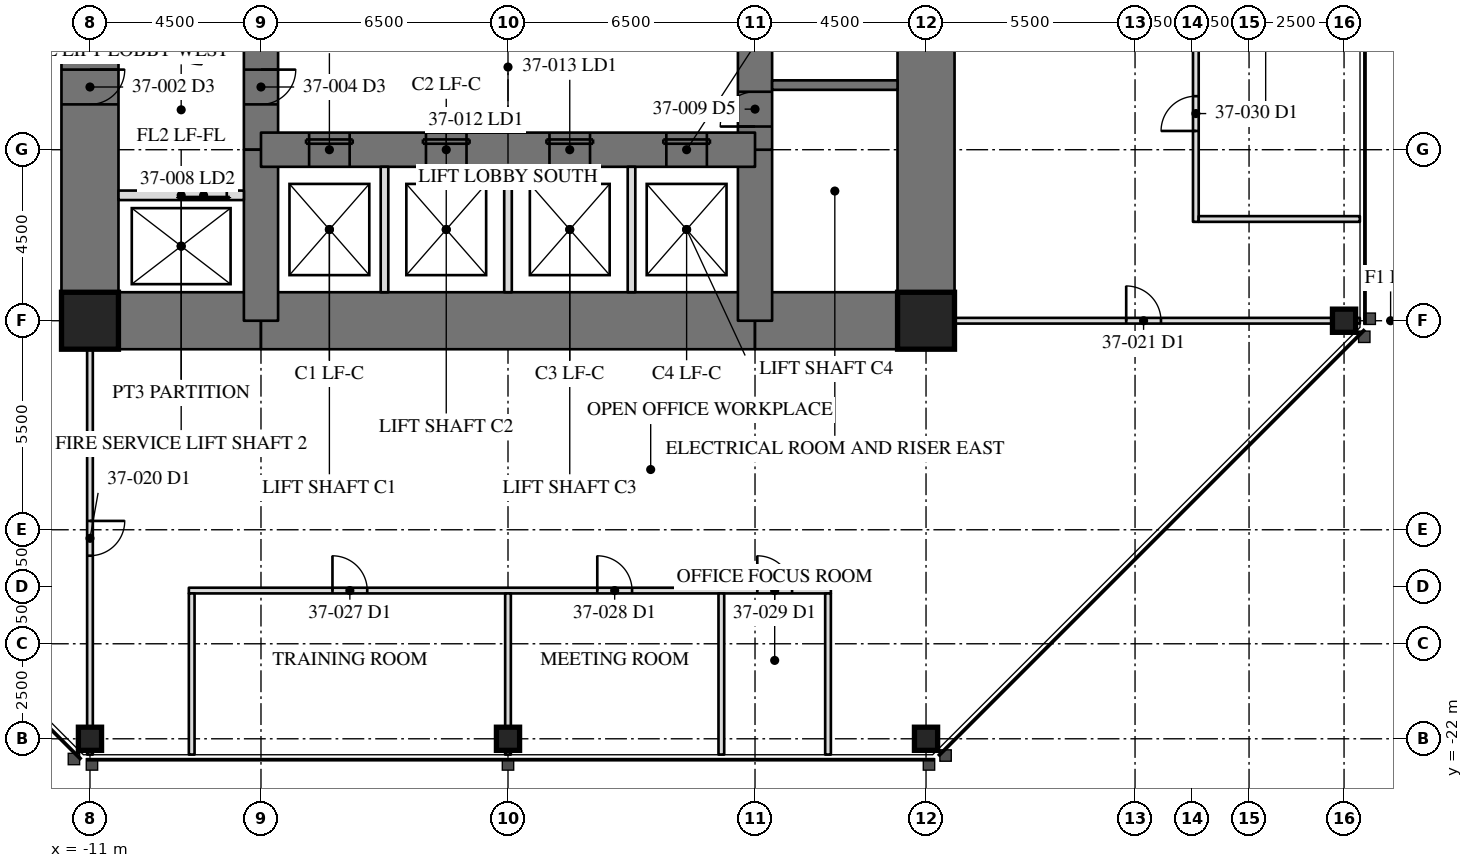
"""IFC4 building model, lengths in metres.
Left out: names, types, materials, properties, quantities, classifications, styles, units other than length and angle.
Written with IfcOpenShell. Run it as: python <this file> out.ifc"""

import sys

from ifc_helpers import new_model, si_unit, direction, frame, frame_2d, origin, origin_2d, place, context, subcontext, project, spatial, rectangle, hollow_rectangle, extrude, element, fill, save


model = new_model("IFC4")
c1 = context("Model", 3, precision=1e-05, world=origin(), true_north=direction((0.0, 1.0)))
c2 = subcontext(c1, "Body", "Model", "MODEL_VIEW")
j1 = project(units=[si_unit("LENGTHUNIT", "METRE"), si_unit("PLANEANGLEUNIT", "RADIAN")], contexts=[c1])
p1 = place(None, origin())
s1 = spatial("IfcSite", under=j1, at=p1, CompositionType="ELEMENT")
p2 = place(p1, origin())
s2 = spatial("IfcBuilding", under=s1, at=p2, CompositionType="ELEMENT")
p3 = place(p2, frame((0.0, 0.0, 158.2)))
s3 = spatial("IfcBuildingStorey", under=s2, at=p3, CompositionType="ELEMENT", Elevation=158.2)
for number, where, z_axis, x_axis in (
    (1, (-11.0, -22.0, 0.0), (0.0, 0.0, 1.0), (1.0, 0.0, 0.0)),
    (2, (0.0, -22.0, 0.0), (0.0, 0.0, 1.0), (1.0, 0.0, 0.0)),
    (3, (11.0, -22.0, 0.0), (0.0, 0.0, 1.0), (1.0, 0.0, 0.0)),
    (4, (22.0, -11.0, 0.0), (0.0, 0.0, 1.0), (0.0, 1.0, 0.0)),
):
    element("IfcColumn", number, at=place(p3, frame(where, z_axis=z_axis, x_axis=x_axis)), inside=s3, PredefinedType="COLUMN", context=c2, shape_type="SweptSolid", body=[
        extrude(hollow_rectangle(XDim=0.61, YDim=0.61, WallThickness=0.076, at=origin_2d()), origin(), (0.0, 0.0, 1.0), 4.1),
    ])
p4 = place(p3, frame((11.0, -11.0, 0.0), z_axis=(0.0, 0.0, 1.0), x_axis=(0.0, 1.0, 0.0)))
e5 = element("IfcWall", 5, at=p4, inside=s3, PredefinedType="SHEAR", context=c2, shape_type="SweptSolid", body=[
    extrude(rectangle(XDim=22.0, YDim=1.5, at=frame_2d((11.0, 0.0))), origin(), (0.0, 0.0, 1.0), 4.1),
])
p5 = place(p4, frame((15.393, 0.0, 0.0)))
e6 = element("IfcOpeningElement", 6, at=p5, cuts=e5, PredefinedType="OPENING", context=c2, shape_type="SweptSolid", body=[
    extrude(rectangle(XDim=0.915, YDim=2.134, at=frame_2d((0.458, 1.067))), frame((0.0, 0.76, 0.0), z_axis=(0.0, -1.0, 0.0), x_axis=(1.0, 0.0, 0.0)), (0.0, 0.0, 1.0), 1.52),
])
p6 = place(p3, frame((-11.0, 11.0, 0.0), z_axis=(0.0, 0.0, 1.0), x_axis=(0.0, -1.0, 0.0)))
e7 = element("IfcWall", 7, at=p6, inside=s3, PredefinedType="SHEAR", context=c2, shape_type="SweptSolid", body=[
    extrude(rectangle(XDim=22.0, YDim=1.5, at=frame_2d((11.0, 0.0))), origin(), (0.0, 0.0, 1.0), 4.1),
])
p7 = place(p6, frame((15.393, 0.0, 0.0)))
e8 = element("IfcOpeningElement", 8, at=p7, cuts=e7, PredefinedType="OPENING", context=c2, shape_type="SweptSolid", body=[
    extrude(rectangle(XDim=0.915, YDim=2.134, at=frame_2d((0.458, 1.067))), frame((0.0, 0.76, 0.0), z_axis=(0.0, -1.0, 0.0), x_axis=(1.0, 0.0, 0.0)), (0.0, 0.0, 1.0), 1.52),
])
p8 = place(p3, frame((-11.0, -11.0, 0.0), z_axis=(0.0, 0.0, 1.0), x_axis=(1.0, 0.0, 0.0)))
e9 = element("IfcWall", 9, at=p8, inside=s3, PredefinedType="SHEAR", context=c2, shape_type="SweptSolid", body=[
    extrude(rectangle(XDim=4.5, YDim=1.5, at=frame_2d((2.25, 0.0))), origin(), (0.0, 0.0, 1.0), 4.1),
])
p9 = place(p3, frame((-6.5, -11.0, 0.0), z_axis=(0.0, 0.0, 1.0), x_axis=(1.0, 0.0, 0.0)))
e10 = element("IfcWall", 10, at=p9, inside=s3, PredefinedType="SHEAR", context=c2, shape_type="SweptSolid", body=[
    extrude(rectangle(XDim=13.0, YDim=1.5, at=frame_2d((6.5, 0.0))), origin(), (0.0, 0.0, 1.0), 4.1),
])
p10 = place(p3, frame((6.5, -11.0, 0.0), z_axis=(0.0, 0.0, 1.0), x_axis=(1.0, 0.0, 0.0)))
e11 = element("IfcWall", 11, at=p10, inside=s3, PredefinedType="SHEAR", context=c2, shape_type="SweptSolid", body=[
    extrude(rectangle(XDim=4.5, YDim=1.5, at=frame_2d((2.25, 0.0))), origin(), (0.0, 0.0, 1.0), 4.1),
])
p11 = place(p3, frame((6.5, -11.0, 0.0), z_axis=(0.0, 0.0, 1.0), x_axis=(0.0, 1.0, 0.0)))
e12 = element("IfcWall", 12, at=p11, inside=s3, PredefinedType="SHEAR", context=c2, shape_type="SweptSolid", body=[
    extrude(rectangle(XDim=4.5, YDim=0.9, at=frame_2d((2.25, 0.0))), origin(), (0.0, 0.0, 1.0), 4.1),
])
p12 = place(p3, frame((6.5, -6.5, 0.0), z_axis=(0.0, 0.0, 1.0), x_axis=(0.0, 1.0, 0.0)))
e13 = element("IfcWall", 13, at=p12, inside=s3, PredefinedType="SHEAR", context=c2, shape_type="SweptSolid", body=[
    extrude(rectangle(XDim=13.0, YDim=0.9, at=frame_2d((6.5, 0.0))), origin(), (0.0, 0.0, 1.0), 4.1),
])
p13 = place(p12, frame((10.893, 0.0, 0.0)))
e14 = element("IfcOpeningElement", 14, at=p13, cuts=e13, PredefinedType="OPENING", context=c2, shape_type="SweptSolid", body=[
    extrude(rectangle(XDim=0.915, YDim=2.134, at=frame_2d((0.458, 1.067))), frame((0.0, 0.46, 0.0), z_axis=(0.0, -1.0, 0.0), x_axis=(1.0, 0.0, 0.0)), (0.0, 0.0, 1.0), 0.92),
])
p14 = place(p12, frame((0.61, 0.0, 0.0)))
e15 = element("IfcOpeningElement", 15, at=p14, cuts=e13, PredefinedType="OPENING", context=c2, shape_type="SweptSolid", body=[
    extrude(rectangle(XDim=0.915, YDim=2.134, at=frame_2d((0.458, 1.067))), frame((0.0, 0.46, 0.0), z_axis=(0.0, -1.0, 0.0), x_axis=(1.0, 0.0, 0.0)), (0.0, 0.0, 1.0), 0.92),
])
p15 = place(p3, frame((-6.5, 6.5, 0.0), z_axis=(0.0, 0.0, 1.0), x_axis=(0.0, -1.0, 0.0)))
e16 = element("IfcWall", 16, at=p15, inside=s3, PredefinedType="SHEAR", context=c2, shape_type="SweptSolid", body=[
    extrude(rectangle(XDim=13.0, YDim=0.9, at=frame_2d((6.5, 0.0))), origin(), (0.0, 0.0, 1.0), 4.1),
])
p16 = place(p15, frame((10.893, 0.0, 0.0)))
e17 = element("IfcOpeningElement", 17, at=p16, cuts=e16, PredefinedType="OPENING", context=c2, shape_type="SweptSolid", body=[
    extrude(rectangle(XDim=0.915, YDim=2.134, at=frame_2d((0.458, 1.067))), frame((0.0, 0.46, 0.0), z_axis=(0.0, -1.0, 0.0), x_axis=(1.0, 0.0, 0.0)), (0.0, 0.0, 1.0), 0.92),
])
p17 = place(p15, frame((0.61, 0.0, 0.0)))
e18 = element("IfcOpeningElement", 18, at=p17, cuts=e16, PredefinedType="OPENING", context=c2, shape_type="SweptSolid", body=[
    extrude(rectangle(XDim=0.915, YDim=2.134, at=frame_2d((0.458, 1.067))), frame((0.0, 0.46, 0.0), z_axis=(0.0, -1.0, 0.0), x_axis=(1.0, 0.0, 0.0)), (0.0, 0.0, 1.0), 0.92),
])
p18 = place(p3, frame((-6.5, -6.5, 0.0), z_axis=(0.0, 0.0, 1.0), x_axis=(0.0, -1.0, 0.0)))
e19 = element("IfcWall", 19, at=p18, inside=s3, PredefinedType="SHEAR", context=c2, shape_type="SweptSolid", body=[
    extrude(rectangle(XDim=4.5, YDim=0.9, at=frame_2d((2.25, 0.0))), origin(), (0.0, 0.0, 1.0), 4.1),
])
p19 = place(p3, frame((-6.5, -6.5, 0.0), z_axis=(0.0, 0.0, 1.0), x_axis=(1.0, 0.0, 0.0)))
e20 = element("IfcWall", 20, at=p19, inside=s3, PredefinedType="SHEAR", context=c2, shape_type="SweptSolid", body=[
    extrude(rectangle(XDim=13.0, YDim=0.9, at=frame_2d((6.5, 0.0))), origin(), (0.0, 0.0, 1.0), 4.1),
])
p20 = place(p19, frame((1.267, 0.0, 0.0)))
e21 = element("IfcOpeningElement", 21, at=p20, cuts=e20, PredefinedType="OPENING", context=c2, shape_type="SweptSolid", body=[
    extrude(rectangle(XDim=1.067, YDim=2.134, at=frame_2d((0.533, 1.067))), frame((0.0, 0.46, 0.0), z_axis=(0.0, -1.0, 0.0), x_axis=(1.0, 0.0, 0.0)), (0.0, 0.0, 1.0), 0.92),
])
p21 = place(p19, frame((4.342, 0.0, 0.0)))
e22 = element("IfcOpeningElement", 22, at=p21, cuts=e20, PredefinedType="OPENING", context=c2, shape_type="SweptSolid", body=[
    extrude(rectangle(XDim=1.067, YDim=2.134, at=frame_2d((0.533, 1.067))), frame((0.0, 0.46, 0.0), z_axis=(0.0, -1.0, 0.0), x_axis=(1.0, 0.0, 0.0)), (0.0, 0.0, 1.0), 0.92),
])
p22 = place(p19, frame((7.592, 0.0, 0.0)))
e23 = element("IfcOpeningElement", 23, at=p22, cuts=e20, PredefinedType="OPENING", context=c2, shape_type="SweptSolid", body=[
    extrude(rectangle(XDim=1.067, YDim=2.134, at=frame_2d((0.533, 1.067))), frame((0.0, 0.46, 0.0), z_axis=(0.0, -1.0, 0.0), x_axis=(1.0, 0.0, 0.0)), (0.0, 0.0, 1.0), 0.92),
])
p23 = place(p19, frame((10.667, 0.0, 0.0)))
e24 = element("IfcOpeningElement", 24, at=p23, cuts=e20, PredefinedType="OPENING", context=c2, shape_type="SweptSolid", body=[
    extrude(rectangle(XDim=1.067, YDim=2.134, at=frame_2d((0.533, 1.067))), frame((0.0, 0.46, 0.0), z_axis=(0.0, -1.0, 0.0), x_axis=(1.0, 0.0, 0.0)), (0.0, 0.0, 1.0), 0.92),
])
for number, where, z_axis, x_axis in (
    (25, (-11.0, -11.0, 0.0), (0.0, 0.0, 1.0), (1.0, 0.0, 0.0)),
    (26, (11.0, -11.0, 0.0), (0.0, 0.0, 1.0), (1.0, 0.0, 0.0)),
):
    element("IfcColumn", number, at=place(p3, frame(where, z_axis=z_axis, x_axis=x_axis)), inside=s3, PredefinedType="COLUMN", context=c2, shape_type="SweptSolid", body=[
        extrude(hollow_rectangle(XDim=1.499, YDim=1.499, WallThickness=0.102, at=origin_2d()), origin(), (0.0, 0.0, 1.0), 4.1),
    ])
p24 = place(p3, frame((6.95, -4.8, 0.0), z_axis=(0.0, 0.0, 1.0), x_axis=(1.0, 0.0, 0.0)))
e27 = element("IfcWall", 27, at=p24, inside=s3, PredefinedType="SOLIDWALL", context=c2, shape_type="SweptSolid", body=[
    extrude(rectangle(XDim=3.3, YDim=0.25, at=frame_2d((1.65, 0.0))), origin(), (0.0, 0.0, 1.0), 3.91),
])
p25 = place(p3, frame((-6.95, -7.7, 0.0), z_axis=(0.0, 0.0, 1.0), x_axis=(-1.0, 0.0, 0.0)))
e28 = element("IfcWall", 28, at=p25, inside=s3, PredefinedType="PARTITIONING", context=c2, shape_type="SweptSolid", body=[
    extrude(rectangle(XDim=3.3, YDim=0.25, at=frame_2d((1.65, 0.0))), origin(), (0.0, 0.0, 1.0), 3.91),
])
p26 = place(p25, frame((0.45, 0.0, 0.0)))
e29 = element("IfcOpeningElement", 29, at=p26, cuts=e28, PredefinedType="OPENING", context=c2, shape_type="SweptSolid", body=[
    extrude(rectangle(XDim=1.219, YDim=2.134, at=frame_2d((0.609, 1.067))), frame((0.0, 0.135, 0.0), z_axis=(0.0, -1.0, 0.0), x_axis=(1.0, 0.0, 0.0)), (0.0, 0.0, 1.0), 0.27),
])
for number, where, z_axis, x_axis in (
    (30, (-3.25, -10.25, 0.0), (0.0, 0.0, 1.0), (0.0, 1.0, 0.0)),
    (31, (0.0, -10.25, 0.0), (0.0, 0.0, 1.0), (0.0, 1.0, 0.0)),
    (32, (3.25, -10.25, 0.0), (0.0, 0.0, 1.0), (0.0, 1.0, 0.0)),
):
    element("IfcWall", number, at=place(p3, frame(where, z_axis=z_axis, x_axis=x_axis)), inside=s3, PredefinedType="PARTITIONING", context=c2, shape_type="SweptSolid", body=[
        extrude(rectangle(XDim=3.3, YDim=0.2, at=frame_2d((1.65, 0.0))), origin(), (0.0, 0.0, 1.0), 3.91),
    ])
p27 = place(p3, frame((-11.0, -11.75, 0.0), z_axis=(0.0, 0.0, 1.0), x_axis=(0.0, -1.0, 0.0)))
e33 = element("IfcWall", 33, at=p27, inside=s3, PredefinedType="PARTITIONING", context=c2, shape_type="SweptSolid", body=[
    extrude(rectangle(XDim=10.665, YDim=0.15, at=frame_2d((5.333, 0.0))), origin(), (0.0, 0.0, 1.0), 3.326),
])
p28 = place(p27, frame((4.518, 0.0, 0.0)))
e34 = element("IfcOpeningElement", 34, at=p28, cuts=e33, PredefinedType="OPENING", context=c2, shape_type="SweptSolid", body=[
    extrude(rectangle(XDim=0.915, YDim=2.134, at=frame_2d((0.458, 1.067))), frame((0.0, 0.085, 0.0), z_axis=(0.0, -1.0, 0.0), x_axis=(1.0, 0.0, 0.0)), (0.0, 0.0, 1.0), 0.17),
])
p29 = place(p3, frame((11.75, -11.0, 0.0), z_axis=(0.0, 0.0, 1.0), x_axis=(1.0, 0.0, 0.0)))
e35 = element("IfcWall", 35, at=p29, inside=s3, PredefinedType="PARTITIONING", context=c2, shape_type="SweptSolid", body=[
    extrude(rectangle(XDim=10.665, YDim=0.15, at=frame_2d((5.333, 0.0))), origin(), (0.0, 0.0, 1.0), 3.326),
])
p30 = place(p29, frame((4.518, 0.0, 0.0)))
e36 = element("IfcOpeningElement", 36, at=p30, cuts=e35, PredefinedType="OPENING", context=c2, shape_type="SweptSolid", body=[
    extrude(rectangle(XDim=0.915, YDim=2.134, at=frame_2d((0.458, 1.067))), frame((0.0, 0.085, 0.0), z_axis=(0.0, -1.0, 0.0), x_axis=(1.0, 0.0, 0.0)), (0.0, 0.0, 1.0), 0.17),
])
p31 = place(p3, frame((-8.398, -18.1, 0.0), z_axis=(0.0, 0.0, 1.0), x_axis=(1.0, 0.0, 0.0)))
e37 = element("IfcWall", 37, at=p31, inside=s3, PredefinedType="PARTITIONING", context=c2, shape_type="SweptSolid", body=[
    extrude(rectangle(XDim=16.894, YDim=0.15, at=frame_2d((8.447, 0.0))), origin(), (0.0, 0.0, 1.0), 3.91),
])
p32 = place(p31, frame((3.779, 0.0, 0.0)))
e38 = element("IfcOpeningElement", 38, at=p32, cuts=e37, PredefinedType="OPENING", context=c2, shape_type="SweptSolid", body=[
    extrude(rectangle(XDim=0.915, YDim=2.134, at=frame_2d((0.458, 1.067))), frame((0.0, 0.085, 0.0), z_axis=(0.0, -1.0, 0.0), x_axis=(1.0, 0.0, 0.0)), (0.0, 0.0, 1.0), 0.17),
])
p33 = place(p31, frame((10.748, 0.0, 0.0)))
e39 = element("IfcOpeningElement", 39, at=p33, cuts=e37, PredefinedType="OPENING", context=c2, shape_type="SweptSolid", body=[
    extrude(rectangle(XDim=0.915, YDim=2.134, at=frame_2d((0.458, 1.067))), frame((0.0, 0.085, 0.0), z_axis=(0.0, -1.0, 0.0), x_axis=(1.0, 0.0, 0.0)), (0.0, 0.0, 1.0), 0.17),
])
p34 = place(p31, frame((14.958, 0.0, 0.0)))
e40 = element("IfcOpeningElement", 40, at=p34, cuts=e37, PredefinedType="OPENING", context=c2, shape_type="SweptSolid", body=[
    extrude(rectangle(XDim=0.915, YDim=2.134, at=frame_2d((0.458, 1.067))), frame((0.0, 0.085, 0.0), z_axis=(0.0, -1.0, 0.0), x_axis=(1.0, 0.0, 0.0)), (0.0, 0.0, 1.0), 0.17),
])
p35 = place(p3, frame((-8.323, -18.175, 0.0), z_axis=(0.0, 0.0, 1.0), x_axis=(0.0, -1.0, 0.0)))
e41 = element("IfcWall", 41, at=p35, inside=s3, PredefinedType="PARTITIONING", context=c2, shape_type="SweptSolid", body=[
    extrude(rectangle(XDim=4.24, YDim=0.15, at=frame_2d((2.12, 0.0))), origin(), (0.0, 0.0, 1.0), 3.91),
])
p36 = place(p3, frame((0.0, -18.175, 0.0), z_axis=(0.0, 0.0, 1.0), x_axis=(0.0, -1.0, 0.0)))
e42 = element("IfcWall", 42, at=p36, inside=s3, PredefinedType="PARTITIONING", context=c2, shape_type="SweptSolid", body=[
    extrude(rectangle(XDim=4.24, YDim=0.15, at=frame_2d((2.12, 0.0))), origin(), (0.0, 0.0, 1.0), 3.326),
])
for number, where, z_axis, x_axis in (
    (43, (5.614, -18.175, 0.0), (0.0, 0.0, 1.0), (0.0, -1.0, 0.0)),
    (44, (8.421, -18.175, 0.0), (0.0, 0.0, 1.0), (0.0, -1.0, 0.0)),
):
    element("IfcWall", number, at=place(p3, frame(where, z_axis=z_axis, x_axis=x_axis)), inside=s3, PredefinedType="PARTITIONING", context=c2, shape_type="SweptSolid", body=[
        extrude(rectangle(XDim=4.24, YDim=0.15, at=frame_2d((2.12, 0.0))), origin(), (0.0, 0.0, 1.0), 3.91),
    ])
p37 = place(p3, frame((18.1, -8.398, 0.0), z_axis=(0.0, 0.0, 1.0), x_axis=(0.0, 1.0, 0.0)))
e45 = element("IfcWall", 45, at=p37, inside=s3, PredefinedType="PARTITIONING", context=c2, shape_type="SweptSolid", body=[
    extrude(rectangle(XDim=16.894, YDim=0.15, at=frame_2d((8.447, 0.0))), origin(), (0.0, 0.0, 1.0), 3.91),
])
p38 = place(p37, frame((2.392, 0.0, 0.0)))
e46 = element("IfcOpeningElement", 46, at=p38, cuts=e45, PredefinedType="OPENING", context=c2, shape_type="SweptSolid", body=[
    extrude(rectangle(XDim=0.915, YDim=2.134, at=frame_2d((0.458, 1.067))), frame((0.0, 0.085, 0.0), z_axis=(0.0, -1.0, 0.0), x_axis=(1.0, 0.0, 0.0)), (0.0, 0.0, 1.0), 0.17),
])
p39 = place(p37, frame((6.553, 0.0, 0.0)))
e47 = element("IfcOpeningElement", 47, at=p39, cuts=e45, PredefinedType="OPENING", context=c2, shape_type="SweptSolid", body=[
    extrude(rectangle(XDim=0.915, YDim=2.134, at=frame_2d((0.458, 1.067))), frame((0.0, 0.085, 0.0), z_axis=(0.0, -1.0, 0.0), x_axis=(1.0, 0.0, 0.0)), (0.0, 0.0, 1.0), 0.17),
])
p40 = place(p37, frame((9.344, 0.0, 0.0)))
e48 = element("IfcOpeningElement", 48, at=p40, cuts=e45, PredefinedType="OPENING", context=c2, shape_type="SweptSolid", body=[
    extrude(rectangle(XDim=0.915, YDim=2.134, at=frame_2d((0.458, 1.067))), frame((0.0, 0.085, 0.0), z_axis=(0.0, -1.0, 0.0), x_axis=(1.0, 0.0, 0.0)), (0.0, 0.0, 1.0), 0.17),
])
p41 = place(p37, frame((13.554, 0.0, 0.0)))
e49 = element("IfcOpeningElement", 49, at=p41, cuts=e45, PredefinedType="OPENING", context=c2, shape_type="SweptSolid", body=[
    extrude(rectangle(XDim=0.915, YDim=2.134, at=frame_2d((0.458, 1.067))), frame((0.0, 0.085, 0.0), z_axis=(0.0, -1.0, 0.0), x_axis=(1.0, 0.0, 0.0)), (0.0, 0.0, 1.0), 0.17),
])
p42 = place(p3, frame((18.175, -8.323, 0.0), z_axis=(0.0, 0.0, 1.0), x_axis=(1.0, 0.0, 0.0)))
e50 = element("IfcWall", 50, at=p42, inside=s3, PredefinedType="PARTITIONING", context=c2, shape_type="SweptSolid", body=[
    extrude(rectangle(XDim=4.24, YDim=0.15, at=frame_2d((2.12, 0.0))), origin(), (0.0, 0.0, 1.0), 3.91),
])
p43 = place(p7, origin())
e51 = element("IfcDoor", 51, at=p43, inside=s3, OperationType="SINGLE_SWING_RIGHT", PredefinedType="DOOR", context=c2, shape_type="SweptSolid", body=[
    extrude(rectangle(XDim=0.915, YDim=2.134, at=frame_2d((0.458, 1.067))), frame((0.0, -0.675, 0.0), z_axis=(0.0, -1.0, 0.0), x_axis=(1.0, 0.0, 0.0)), (0.0, 0.0, 1.0), 0.05),
])
fill(e8, e51)
p44 = place(p16, origin())
e52 = element("IfcDoor", 52, at=p44, inside=s3, OperationType="SINGLE_SWING_RIGHT", PredefinedType="DOOR", context=c2, shape_type="SweptSolid", body=[
    extrude(rectangle(XDim=0.915, YDim=2.134, at=frame_2d((0.458, 1.067))), frame((0.0, -0.375, 0.0), z_axis=(0.0, -1.0, 0.0), x_axis=(1.0, 0.0, 0.0)), (0.0, 0.0, 1.0), 0.05),
])
fill(e17, e52)
p45 = place(p26, origin())
e53 = element("IfcDoor", 53, at=p45, inside=s3, OperationType="SLIDING_TO_LEFT", PredefinedType="DOOR", context=c2, shape_type="SweptSolid", body=[
    extrude(rectangle(XDim=1.219, YDim=2.134, at=frame_2d((0.609, 1.067))), frame((0.0, 0.025, 0.0), z_axis=(0.0, -1.0, 0.0), x_axis=(1.0, 0.0, 0.0)), (0.0, 0.0, 1.0), 0.05),
])
fill(e29, e53)
p46 = place(p14, origin())
e54 = element("IfcDoor", 54, at=p46, inside=s3, OperationType="SINGLE_SWING_RIGHT", PredefinedType="DOOR", context=c2, shape_type="SweptSolid", body=[
    extrude(rectangle(XDim=0.915, YDim=2.134, at=frame_2d((0.458, 1.067))), frame((0.0, -0.375, 0.0), z_axis=(0.0, -1.0, 0.0), x_axis=(1.0, 0.0, 0.0)), (0.0, 0.0, 1.0), 0.05),
])
fill(e15, e54)
p47 = place(p20, origin())
e55 = element("IfcDoor", 55, at=p47, inside=s3, OperationType="SLIDING_TO_LEFT", PredefinedType="DOOR", context=c2, shape_type="SweptSolid", body=[
    extrude(rectangle(XDim=1.067, YDim=2.134, at=frame_2d((0.533, 1.067))), frame((0.0, -0.375, 0.0), z_axis=(0.0, -1.0, 0.0), x_axis=(1.0, 0.0, 0.0)), (0.0, 0.0, 1.0), 0.05),
])
fill(e21, e55)
p48 = place(p21, origin())
e56 = element("IfcDoor", 56, at=p48, inside=s3, OperationType="SLIDING_TO_LEFT", PredefinedType="DOOR", context=c2, shape_type="SweptSolid", body=[
    extrude(rectangle(XDim=1.067, YDim=2.134, at=frame_2d((0.533, 1.067))), frame((0.0, -0.375, 0.0), z_axis=(0.0, -1.0, 0.0), x_axis=(1.0, 0.0, 0.0)), (0.0, 0.0, 1.0), 0.05),
])
fill(e22, e56)
p49 = place(p22, origin())
e57 = element("IfcDoor", 57, at=p49, inside=s3, OperationType="SLIDING_TO_LEFT", PredefinedType="DOOR", context=c2, shape_type="SweptSolid", body=[
    extrude(rectangle(XDim=1.067, YDim=2.134, at=frame_2d((0.533, 1.067))), frame((0.0, -0.375, 0.0), z_axis=(0.0, -1.0, 0.0), x_axis=(1.0, 0.0, 0.0)), (0.0, 0.0, 1.0), 0.05),
])
fill(e23, e57)
p50 = place(p23, origin())
e58 = element("IfcDoor", 58, at=p50, inside=s3, OperationType="SLIDING_TO_LEFT", PredefinedType="DOOR", context=c2, shape_type="SweptSolid", body=[
    extrude(rectangle(XDim=1.067, YDim=2.134, at=frame_2d((0.533, 1.067))), frame((0.0, -0.375, 0.0), z_axis=(0.0, -1.0, 0.0), x_axis=(1.0, 0.0, 0.0)), (0.0, 0.0, 1.0), 0.05),
])
fill(e24, e58)
p51 = place(p28, origin())
e59 = element("IfcDoor", 59, at=p51, inside=s3, OperationType="SINGLE_SWING_LEFT", PredefinedType="DOOR", context=c2, shape_type="SweptSolid", body=[
    extrude(rectangle(XDim=0.915, YDim=2.134, at=frame_2d((0.458, 1.067))), frame((0.0, 0.025, 0.0), z_axis=(0.0, -1.0, 0.0), x_axis=(1.0, 0.0, 0.0)), (0.0, 0.0, 1.0), 0.05),
])
fill(e34, e59)
p52 = place(p30, origin())
e60 = element("IfcDoor", 60, at=p52, inside=s3, OperationType="SINGLE_SWING_LEFT", PredefinedType="DOOR", context=c2, shape_type="SweptSolid", body=[
    extrude(rectangle(XDim=0.915, YDim=2.134, at=frame_2d((0.458, 1.067))), frame((0.0, 0.025, 0.0), z_axis=(0.0, -1.0, 0.0), x_axis=(1.0, 0.0, 0.0)), (0.0, 0.0, 1.0), 0.05),
])
fill(e36, e60)
p53 = place(p32, origin())
e61 = element("IfcDoor", 61, at=p53, inside=s3, OperationType="SINGLE_SWING_LEFT", PredefinedType="DOOR", context=c2, shape_type="SweptSolid", body=[
    extrude(rectangle(XDim=0.915, YDim=2.134, at=frame_2d((0.458, 1.067))), frame((0.0, 0.025, 0.0), z_axis=(0.0, -1.0, 0.0), x_axis=(1.0, 0.0, 0.0)), (0.0, 0.0, 1.0), 0.05),
])
fill(e38, e61)
p54 = place(p33, origin())
e62 = element("IfcDoor", 62, at=p54, inside=s3, OperationType="SINGLE_SWING_LEFT", PredefinedType="DOOR", context=c2, shape_type="SweptSolid", body=[
    extrude(rectangle(XDim=0.915, YDim=2.134, at=frame_2d((0.458, 1.067))), frame((0.0, 0.025, 0.0), z_axis=(0.0, -1.0, 0.0), x_axis=(1.0, 0.0, 0.0)), (0.0, 0.0, 1.0), 0.05),
])
fill(e39, e62)
p55 = place(p34, origin())
e63 = element("IfcDoor", 63, at=p55, inside=s3, OperationType="SINGLE_SWING_LEFT", PredefinedType="DOOR", context=c2, shape_type="SweptSolid", body=[
    extrude(rectangle(XDim=0.915, YDim=2.134, at=frame_2d((0.458, 1.067))), frame((0.0, 0.025, 0.0), z_axis=(0.0, -1.0, 0.0), x_axis=(1.0, 0.0, 0.0)), (0.0, 0.0, 1.0), 0.05),
])
fill(e40, e63)
p56 = place(p38, origin())
e64 = element("IfcDoor", 64, at=p56, inside=s3, OperationType="SINGLE_SWING_LEFT", PredefinedType="DOOR", context=c2, shape_type="SweptSolid", body=[
    extrude(rectangle(XDim=0.915, YDim=2.134, at=frame_2d((0.458, 1.067))), frame((0.0, 0.025, 0.0), z_axis=(0.0, -1.0, 0.0), x_axis=(1.0, 0.0, 0.0)), (0.0, 0.0, 1.0), 0.05),
])
fill(e46, e64)
save(model, sys.argv[1])
